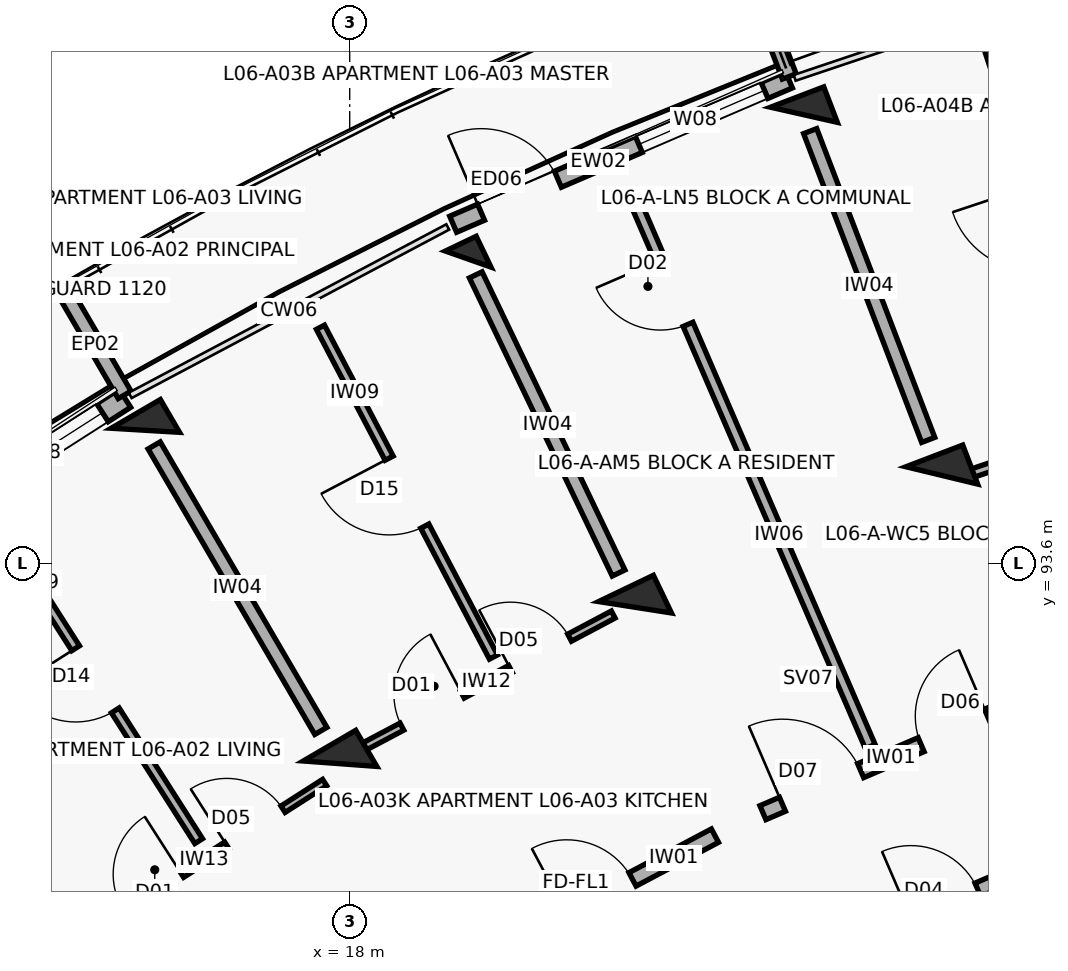
"""IFC4 building model, lengths in metres.
Left out: names, types, materials, properties, quantities, classifications, styles, units other than length and angle.
Written with IfcOpenShell. Run it as: python <this file> out.ifc"""

import sys

from ifc_helpers import new_model, si_unit, direction, frame, frame_2d, origin, origin_2d, place, context, subcontext, project, spatial, rectangle, extrude, element, fill, save


model = new_model("IFC4")
c1 = context("Model", 3, precision=1e-05, world=origin(), true_north=direction((0.0, 1.0)))
c2 = subcontext(c1, "Body", "Model", "MODEL_VIEW")
j1 = project(units=[si_unit("LENGTHUNIT", "METRE"), si_unit("PLANEANGLEUNIT", "RADIAN")], contexts=[c1])
p1 = place(None, origin())
s1 = spatial("IfcSite", under=j1, at=p1, CompositionType="ELEMENT")
p2 = place(p1, origin())
s2 = spatial("IfcBuilding", under=s1, at=p2, CompositionType="ELEMENT")
p3 = place(p2, frame((0.0, 0.0, 20.5)))
s3 = spatial("IfcBuildingStorey", under=s2, at=p3, CompositionType="ELEMENT", Elevation=20.5)
p4 = place(p3, frame((17.873, 90.96, 0.0), z_axis=(0.0, 0.0, 1.0), x_axis=(-0.504226211181, 0.863571611366, 0.0)))
e1 = element("IfcColumn", 1, at=p4, inside=s3, PredefinedType="COLUMN", context=c2, shape_type="SweptSolid", body=[
    extrude(rectangle(XDim=0.55, YDim=0.8, at=origin_2d()), origin(), (0.0, 0.0, 1.0), 3.1),
])
p5 = place(p3, frame((15.311, 95.347, 0.0), z_axis=(0.0, 0.0, 1.0), x_axis=(-0.504226211181, 0.863571611366, 0.0)))
e2 = element("IfcColumn", 2, at=p5, inside=s3, PredefinedType="COLUMN", context=c2, shape_type="SweptSolid", body=[
    extrude(rectangle(XDim=0.5, YDim=0.75, at=origin_2d()), origin(), (0.0, 0.0, 1.0), 3.1),
])
p6 = place(p3, frame((21.754, 93.019, 0.0), z_axis=(0.0, 0.0, 1.0), x_axis=(-0.432085748802, 0.901832526405, 0.0)))
e3 = element("IfcColumn", 3, at=p6, inside=s3, PredefinedType="COLUMN", context=c2, shape_type="SweptSolid", body=[
    extrude(rectangle(XDim=0.55, YDim=0.8, at=origin_2d()), origin(), (0.0, 0.0, 1.0), 3.1),
])
p7 = place(p3, frame((19.559, 97.6, 0.0), z_axis=(0.0, 0.0, 1.0), x_axis=(-0.432085748802, 0.901832526405, 0.0)))
e4 = element("IfcColumn", 4, at=p7, inside=s3, PredefinedType="COLUMN", context=c2, shape_type="SweptSolid", body=[
    extrude(rectangle(XDim=0.45, YDim=0.45, at=origin_2d()), origin(), (0.0, 0.0, 1.0), 3.1),
])
p8 = place(p3, frame((25.79, 94.753, 0.0), z_axis=(0.0, 0.0, 1.0), x_axis=(-0.357064076459, 0.934079892355, 0.0)))
e5 = element("IfcColumn", 5, at=p8, inside=s3, PredefinedType="COLUMN", context=c2, shape_type="SweptSolid", body=[
    extrude(rectangle(XDim=0.55, YDim=0.8, at=origin_2d()), origin(), (0.0, 0.0, 1.0), 3.1),
])
p9 = place(p3, frame((23.976, 99.499, 0.0), z_axis=(0.0, 0.0, 1.0), x_axis=(-0.357064076459, 0.934079892355, 0.0)))
e6 = element("IfcColumn", 6, at=p9, inside=s3, PredefinedType="COLUMN", context=c2, shape_type="SweptSolid", body=[
    extrude(rectangle(XDim=0.5, YDim=0.75, at=origin_2d()), origin(), (0.0, 0.0, 1.0), 3.1),
])
p10 = place(p3, frame((10.992, 93.176, 0.0), z_axis=(0.0, 0.0, 1.0), x_axis=(0.84226218024, 0.539068103061, 0.0)))
e7 = element("IfcWall", 7, at=p10, inside=s3, PredefinedType="SOLIDWALL", context=c2, shape_type="SweptSolid", body=[
    extrude(rectangle(XDim=4.809, YDim=0.282, at=frame_2d((2.404, 0.0))), origin(), (0.0, 0.0, 1.0), 2.25),
])
p11 = place(p10, frame((0.4, 0.0, 0.0)))
e8 = element("IfcOpeningElement", 8, at=p11, cuts=e7, PredefinedType="OPENING", context=c2, shape_type="SweptSolid", body=[
    extrude(rectangle(XDim=1.1, YDim=2.15, at=frame_2d((0.55, 1.075))), frame((0.0, 0.151, 0.0), z_axis=(0.0, -1.0, 0.0), x_axis=(1.0, 0.0, 0.0)), (0.0, 0.0, 1.0), 0.302),
])
p12 = place(p10, frame((2.659, 0.0, 0.35)))
e9 = element("IfcOpeningElement", 9, at=p12, cuts=e7, PredefinedType="OPENING", context=c2, shape_type="SweptSolid", body=[
    extrude(rectangle(XDim=1.8, YDim=1.65, at=frame_2d((0.9, 0.825))), frame((0.0, 0.151, 0.0), z_axis=(0.0, -1.0, 0.0), x_axis=(1.0, 0.0, 0.0)), (0.0, 0.0, 1.0), 0.302),
])
p13 = place(p3, frame((15.039, 95.813, 0.0), z_axis=(0.0, 0.0, 1.0), x_axis=(-0.504228145431, 0.863570481985, 0.0)))
e10 = element("IfcWall", 10, at=p13, inside=s3, PredefinedType="PARAPET", context=c2, shape_type="SweptSolid", body=[
    extrude(rectangle(XDim=1.53, YDim=0.195, at=frame_2d((0.765, 0.0))), origin(), (0.0, 0.0, 1.0), 2.25),
])
p14 = place(p3, frame((19.361, 98.059, 0.0), z_axis=(0.0, 0.0, 1.0), x_axis=(0.918711189033, 0.394930058548, 0.0)))
e11 = element("IfcWall", 11, at=p14, inside=s3, PredefinedType="SOLIDWALL", context=c2, shape_type="SweptSolid", body=[
    extrude(rectangle(XDim=4.809, YDim=0.23, at=frame_2d((2.404, 0.0))), origin(), (0.0, 0.0, 1.0), 2.25),
])
p15 = place(p14, frame((0.4, 0.0, 0.0)))
e12 = element("IfcOpeningElement", 12, at=p15, cuts=e11, PredefinedType="OPENING", context=c2, shape_type="SweptSolid", body=[
    extrude(rectangle(XDim=1.1, YDim=2.15, at=frame_2d((0.55, 1.075))), frame((0.0, 0.125, 0.0), z_axis=(0.0, -1.0, 0.0), x_axis=(1.0, 0.0, 0.0)), (0.0, 0.0, 1.0), 0.25),
])
p16 = place(p14, frame((2.659, 0.0, 0.35)))
e13 = element("IfcOpeningElement", 13, at=p16, cuts=e11, PredefinedType="OPENING", context=c2, shape_type="SweptSolid", body=[
    extrude(rectangle(XDim=1.8, YDim=1.65, at=frame_2d((0.9, 0.825))), frame((0.0, 0.125, 0.0), z_axis=(0.0, -1.0, 0.0), x_axis=(1.0, 0.0, 0.0)), (0.0, 0.0, 1.0), 0.25),
])
p17 = place(p3, frame((23.783, 100.003, 0.0), z_axis=(0.0, 0.0, 1.0), x_axis=(-0.356957296461, 0.934120703391, 0.0)))
e14 = element("IfcWall", 14, at=p17, inside=s3, PredefinedType="PARAPET", context=c2, shape_type="SweptSolid", body=[
    extrude(rectangle(XDim=1.53, YDim=0.195, at=frame_2d((0.765, 0.0))), origin(), (0.0, 0.0, 1.0), 2.25),
])
p18 = place(p3, frame((14.482, 88.672, 0.0), z_axis=(0.0, 0.0, 1.0), x_axis=(0.842245628842, 0.539093962771, 0.0)))
e15 = element("IfcWall", 15, at=p18, inside=s3, PredefinedType="PARTITIONING", context=c2, shape_type="SweptSolid", body=[
    extrude(rectangle(XDim=3.785, YDim=0.1, at=frame_2d((1.893, 0.0))), origin(), (0.0, 0.0, 1.0), 2.08),
])
p19 = place(p18, frame((0.65, 0.0, 0.0)))
e16 = element("IfcOpeningElement", 16, at=p19, cuts=e15, PredefinedType="OPENING", context=c2, shape_type="SweptSolid", body=[
    extrude(rectangle(XDim=0.9, YDim=2.1, at=frame_2d((0.45, 1.05))), frame((0.0, 0.06, 0.0), z_axis=(0.0, -1.0, 0.0), x_axis=(1.0, 0.0, 0.0)), (0.0, 0.0, 1.0), 0.12),
])
p20 = place(p18, frame((2.255, 0.0, 0.0)))
e17 = element("IfcOpeningElement", 17, at=p20, cuts=e15, PredefinedType="OPENING", context=c2, shape_type="SweptSolid", body=[
    extrude(rectangle(XDim=0.88, YDim=2.1, at=frame_2d((0.44, 1.05))), frame((0.0, 0.06, 0.0), z_axis=(0.0, -1.0, 0.0), x_axis=(1.0, 0.0, 0.0)), (0.0, 0.0, 1.0), 0.12),
])
p21 = place(p3, frame((16.013, 89.942, 0.0), z_axis=(0.0, 0.0, 1.0), x_axis=(-0.537785480308, 0.843081714409, 0.0)))
e18 = element("IfcWall", 18, at=p21, inside=s3, PredefinedType="PARTITIONING", context=c2, shape_type="SweptSolid", body=[
    extrude(rectangle(XDim=5.05, YDim=0.12, at=frame_2d((2.525, 0.0))), origin(), (0.0, 0.0, 1.0), 2.08),
])
p22 = place(p21, frame((2.04, 0.0, 0.0)))
e19 = element("IfcOpeningElement", 19, at=p22, cuts=e18, PredefinedType="OPENING", context=c2, shape_type="SweptSolid", body=[
    extrude(rectangle(XDim=0.97, YDim=2.1, at=frame_2d((0.485, 1.05))), frame((0.0, 0.07, 0.0), z_axis=(0.0, -1.0, 0.0), x_axis=(1.0, 0.0, 0.0)), (0.0, 0.0, 1.0), 0.14),
])
p23 = place(p3, frame((19.77, 88.404, 0.0), z_axis=(0.0, 0.0, 1.0), x_axis=(0.883410853063, 0.468599258099, 0.0)))
e20 = element("IfcWall", 20, at=p23, inside=s3, PredefinedType="SOLIDWALL", context=c2, shape_type="SweptSolid", body=[
    extrude(rectangle(XDim=3.436, YDim=0.2, at=frame_2d((1.718, 0.0))), origin(), (0.0, 0.0, 1.0), 2.08),
])
p24 = place(p23, frame((1.228, 0.0, 0.0)))
e21 = element("IfcOpeningElement", 21, at=p24, cuts=e20, PredefinedType="OPENING", context=c2, shape_type="SweptSolid", body=[
    extrude(rectangle(XDim=0.98, YDim=2.15, at=frame_2d((0.49, 1.075))), frame((0.0, 0.11, 0.0), z_axis=(0.0, -1.0, 0.0), x_axis=(1.0, 0.0, 0.0)), (0.0, 0.0, 1.0), 0.22),
])
p25 = place(p3, frame((18.113, 91.144, 0.0), z_axis=(0.0, 0.0, 1.0), x_axis=(0.88341855112, 0.46858474531, 0.0)))
e22 = element("IfcWall", 22, at=p25, inside=s3, PredefinedType="PARTITIONING", context=c2, shape_type="SweptSolid", body=[
    extrude(rectangle(XDim=3.797, YDim=0.105, at=frame_2d((1.898, 0.0))), origin(), (0.0, 0.0, 1.0), 2.08),
])
p26 = place(p25, frame((0.65, 0.0, 0.0)))
e23 = element("IfcOpeningElement", 23, at=p26, cuts=e22, PredefinedType="OPENING", context=c2, shape_type="SweptSolid", body=[
    extrude(rectangle(XDim=0.9, YDim=2.1, at=frame_2d((0.45, 1.05))), frame((0.0, 0.062, 0.0), z_axis=(0.0, -1.0, 0.0), x_axis=(1.0, 0.0, 0.0)), (0.0, 0.0, 1.0), 0.125),
])
p27 = place(p25, frame((2.267, 0.0, 0.0)))
e24 = element("IfcOpeningElement", 24, at=p27, cuts=e22, PredefinedType="OPENING", context=c2, shape_type="SweptSolid", body=[
    extrude(rectangle(XDim=0.88, YDim=2.1, at=frame_2d((0.44, 1.05))), frame((0.0, 0.062, 0.0), z_axis=(0.0, -1.0, 0.0), x_axis=(1.0, 0.0, 0.0)), (0.0, 0.0, 1.0), 0.125),
])
p28 = place(p3, frame((19.891, 92.364, 0.0), z_axis=(0.0, 0.0, 1.0), x_axis=(-0.464567298878, 0.885537816704, 0.0)))
e25 = element("IfcWall", 25, at=p28, inside=s3, PredefinedType="PARTITIONING", context=c2, shape_type="SweptSolid", body=[
    extrude(rectangle(XDim=4.9, YDim=0.12, at=frame_2d((2.45, 0.0))), origin(), (0.0, 0.0, 1.0), 2.08),
])
p29 = place(p28, frame((1.945, 0.0, 0.0)))
e26 = element("IfcOpeningElement", 26, at=p29, cuts=e25, PredefinedType="OPENING", context=c2, shape_type="SweptSolid", body=[
    extrude(rectangle(XDim=1.01, YDim=2.1, at=frame_2d((0.505, 1.05))), frame((0.0, 0.07, 0.0), z_axis=(0.0, -1.0, 0.0), x_axis=(1.0, 0.0, 0.0)), (0.0, 0.0, 1.0), 0.14),
])
p30 = place(p3, frame((17.621, 91.392, 0.0), z_axis=(0.0, 0.0, 1.0), x_axis=(-0.504216452091, 0.863577309475, 0.0)))
e27 = element("IfcWall", 27, at=p30, inside=s3, PredefinedType="SOLIDWALL", context=c2, shape_type="SweptSolid", body=[
    extrude(rectangle(XDim=4.35, YDim=0.185, at=frame_2d((2.175, 0.0))), origin(), (0.0, 0.0, 1.0), 2.08),
])
p31 = place(p3, frame((23.437, 90.316, 0.0), z_axis=(0.0, 0.0, 1.0), x_axis=(0.918718172399, 0.394913813008, 0.0)))
e28 = element("IfcWall", 28, at=p31, inside=s3, PredefinedType="SOLIDWALL", context=c2, shape_type="SweptSolid", body=[
    extrude(rectangle(XDim=3.436, YDim=0.2, at=frame_2d((1.718, 0.0))), origin(), (0.0, 0.0, 1.0), 2.08),
])
p32 = place(p31, frame((0.28, 0.0, 0.0)))
e29 = element("IfcOpeningElement", 29, at=p32, cuts=e28, PredefinedType="OPENING", context=c2, shape_type="SweptSolid", body=[
    extrude(rectangle(XDim=1.12, YDim=2.15, at=frame_2d((0.56, 1.075))), frame((0.0, 0.11, 0.0), z_axis=(0.0, -1.0, 0.0), x_axis=(1.0, 0.0, 0.0)), (0.0, 0.0, 1.0), 0.22),
])
p33 = place(p31, frame((2.266, 0.0, 0.0)))
e30 = element("IfcOpeningElement", 30, at=p33, cuts=e28, PredefinedType="OPENING", context=c2, shape_type="SweptSolid", body=[
    extrude(rectangle(XDim=0.95, YDim=2.1, at=frame_2d((0.475, 1.05))), frame((0.0, 0.11, 0.0), z_axis=(0.0, -1.0, 0.0), x_axis=(1.0, 0.0, 0.0)), (0.0, 0.0, 1.0), 0.22),
])
p34 = place(p3, frame((24.322, 88.467, 0.0), z_axis=(0.0, 0.0, 1.0), x_axis=(0.918723391052, 0.394901672235, 0.0)))
e31 = element("IfcWall", 31, at=p34, inside=s3, PredefinedType="SOLIDWALL", context=c2, shape_type="SweptSolid", body=[
    extrude(rectangle(XDim=3.269, YDim=0.19, at=frame_2d((1.634, 0.0))), origin(), (0.0, 0.0, 1.0), 2.08),
])
p35 = place(p34, frame((1.154, 0.0, 0.0)))
e32 = element("IfcOpeningElement", 32, at=p35, cuts=e31, PredefinedType="OPENING", context=c2, shape_type="SweptSolid", body=[
    extrude(rectangle(XDim=0.96, YDim=2.1, at=frame_2d((0.48, 1.05))), frame((0.0, 0.105, 0.0), z_axis=(0.0, -1.0, 0.0), x_axis=(1.0, 0.0, 0.0)), (0.0, 0.0, 1.0), 0.21),
])
p36 = place(p3, frame((24.849, 91.187, 0.0), z_axis=(0.0, 0.0, 1.0), x_axis=(-0.396278945437, 0.91813016365, 0.0)))
e33 = element("IfcWall", 33, at=p36, inside=s3, PredefinedType="PARTITIONING", context=c2, shape_type="SweptSolid", body=[
    extrude(rectangle(XDim=7.95, YDim=0.14, at=frame_2d((3.975, 0.0))), origin(), (0.0, 0.0, 1.0), 2.08),
])
p37 = place(p36, frame((6.05, 0.0, 0.0)))
e34 = element("IfcOpeningElement", 34, at=p37, cuts=e33, PredefinedType="OPENING", context=c2, shape_type="SweptSolid", body=[
    extrude(rectangle(XDim=0.92, YDim=2.1, at=frame_2d((0.46, 1.05))), frame((0.0, 0.08, 0.0), z_axis=(0.0, -1.0, 0.0), x_axis=(1.0, 0.0, 0.0)), (0.0, 0.0, 1.0), 0.16),
])
p38 = place(p3, frame((21.538, 93.469, 0.0), z_axis=(0.0, 0.0, 1.0), x_axis=(-0.432086898897, 0.901831975371, 0.0)))
e35 = element("IfcWall", 35, at=p38, inside=s3, PredefinedType="SOLIDWALL", context=c2, shape_type="SweptSolid", body=[
    extrude(rectangle(XDim=4.35, YDim=0.185, at=frame_2d((2.175, 0.0))), origin(), (0.0, 0.0, 1.0), 2.08),
])
p39 = place(p3, frame((26.11, 94.756, 0.0), z_axis=(0.0, 0.0, 1.0), x_axis=(0.947873924847, 0.318645606584, 0.0)))
e36 = element("IfcWall", 36, at=p39, inside=s3, PredefinedType="PARTITIONING", context=c2, shape_type="SweptSolid", body=[
    extrude(rectangle(XDim=3.785, YDim=0.115, at=frame_2d((1.893, 0.0))), origin(), (0.0, 0.0, 1.0), 2.08),
])
p40 = place(p39, frame((0.65, 0.0, 0.0)))
e37 = element("IfcOpeningElement", 37, at=p40, cuts=e36, PredefinedType="OPENING", context=c2, shape_type="SweptSolid", body=[
    extrude(rectangle(XDim=0.9, YDim=2.1, at=frame_2d((0.45, 1.05))), frame((0.0, 0.067, 0.0), z_axis=(0.0, -1.0, 0.0), x_axis=(1.0, 0.0, 0.0)), (0.0, 0.0, 1.0), 0.135),
])
p41 = place(p39, frame((2.255, 0.0, 0.0)))
e38 = element("IfcOpeningElement", 38, at=p41, cuts=e36, PredefinedType="OPENING", context=c2, shape_type="SweptSolid", body=[
    extrude(rectangle(XDim=0.88, YDim=2.1, at=frame_2d((0.44, 1.05))), frame((0.0, 0.067, 0.0), z_axis=(0.0, -1.0, 0.0), x_axis=(1.0, 0.0, 0.0)), (0.0, 0.0, 1.0), 0.135),
])
p42 = place(p3, frame((27.98, 95.642, 0.0), z_axis=(0.0, 0.0, 1.0), x_axis=(-0.315749098291, 0.948842719806, 0.0)))
e39 = element("IfcWall", 39, at=p42, inside=s3, PredefinedType="PARTITIONING", context=c2, shape_type="SweptSolid", body=[
    extrude(rectangle(XDim=5.05, YDim=0.12, at=frame_2d((2.525, 0.0))), origin(), (0.0, 0.0, 1.0), 2.08),
])
p43 = place(p42, frame((1.96, 0.0, 0.0)))
e40 = element("IfcOpeningElement", 40, at=p43, cuts=e39, PredefinedType="OPENING", context=c2, shape_type="SweptSolid", body=[
    extrude(rectangle(XDim=1.13, YDim=2.1, at=frame_2d((0.565, 1.05))), frame((0.0, 0.07, 0.0), z_axis=(0.0, -1.0, 0.0), x_axis=(1.0, 0.0, 0.0)), (0.0, 0.0, 1.0), 0.14),
])
p44 = place(p3, frame((25.611, 95.22, 0.0), z_axis=(0.0, 0.0, 1.0), x_axis=(-0.357064016205, 0.934079915388, 0.0)))
e41 = element("IfcWall", 41, at=p44, inside=s3, PredefinedType="SOLIDWALL", context=c2, shape_type="SweptSolid", body=[
    extrude(rectangle(XDim=4.35, YDim=0.185, at=frame_2d((2.175, 0.0))), origin(), (0.0, 0.0, 1.0), 2.08),
])
p45 = place(p12, origin())
e42 = element("IfcWindow", 42, at=p45, inside=s3, PartitioningType="TRIPLE_PANEL_VERTICAL", PredefinedType="WINDOW", context=c2, shape_type="SweptSolid", body=[
    extrude(rectangle(XDim=1.8, YDim=1.65, at=frame_2d((0.9, 0.825))), frame((0.0, 0.03, 0.0), z_axis=(0.0, -1.0, 0.0), x_axis=(1.0, 0.0, 0.0)), (0.0, 0.0, 1.0), 0.06),
])
fill(e9, e42)
p46 = place(p15, origin())
e43 = element("IfcDoor", 43, at=p46, inside=s3, OperationType="SINGLE_SWING_LEFT", PredefinedType="DOOR", context=c2, shape_type="SweptSolid", body=[
    extrude(rectangle(XDim=1.1, YDim=2.15, at=frame_2d((0.55, 1.075))), frame((0.0, 0.025, 0.0), z_axis=(0.0, -1.0, 0.0), x_axis=(1.0, 0.0, 0.0)), (0.0, 0.0, 1.0), 0.05),
])
fill(e12, e43)
p47 = place(p16, origin())
e44 = element("IfcWindow", 44, at=p47, inside=s3, PartitioningType="TRIPLE_PANEL_VERTICAL", PredefinedType="WINDOW", context=c2, shape_type="SweptSolid", body=[
    extrude(rectangle(XDim=1.8, YDim=1.65, at=frame_2d((0.9, 0.825))), frame((0.0, 0.03, 0.0), z_axis=(0.0, -1.0, 0.0), x_axis=(1.0, 0.0, 0.0)), (0.0, 0.0, 1.0), 0.06),
])
fill(e13, e44)
p48 = place(p19, origin())
e45 = element("IfcDoor", 45, at=p48, inside=s3, OperationType="SINGLE_SWING_RIGHT", PredefinedType="DOOR", context=c2, shape_type="SweptSolid", body=[
    extrude(rectangle(XDim=0.9, YDim=2.1, at=frame_2d((0.45, 1.05))), frame((0.0, 0.025, 0.0), z_axis=(0.0, -1.0, 0.0), x_axis=(1.0, 0.0, 0.0)), (0.0, 0.0, 1.0), 0.05),
])
fill(e16, e45)
p49 = place(p20, origin())
e46 = element("IfcDoor", 46, at=p49, inside=s3, OperationType="SINGLE_SWING_LEFT", PredefinedType="DOOR", context=c2, shape_type="SweptSolid", body=[
    extrude(rectangle(XDim=0.88, YDim=2.1, at=frame_2d((0.44, 1.05))), frame((0.0, 0.025, 0.0), z_axis=(0.0, -1.0, 0.0), x_axis=(1.0, 0.0, 0.0)), (0.0, 0.0, 1.0), 0.05),
])
fill(e17, e46)
p50 = place(p22, origin())
e47 = element("IfcDoor", 47, at=p50, inside=s3, OperationType="SINGLE_SWING_RIGHT", PredefinedType="DOOR", context=c2, shape_type="SweptSolid", body=[
    extrude(rectangle(XDim=0.97, YDim=2.1, at=frame_2d((0.485, 1.05))), frame((0.0, 0.025, 0.0), z_axis=(0.0, -1.0, 0.0), x_axis=(1.0, 0.0, 0.0)), (0.0, 0.0, 1.0), 0.05),
])
fill(e19, e47)
p51 = place(p24, origin())
e48 = element("IfcDoor", 48, at=p51, inside=s3, OperationType="SINGLE_SWING_LEFT", PredefinedType="DOOR", context=c2, shape_type="SweptSolid", body=[
    extrude(rectangle(XDim=0.98, YDim=2.15, at=frame_2d((0.49, 1.075))), frame((0.0, 0.025, 0.0), z_axis=(0.0, -1.0, 0.0), x_axis=(1.0, 0.0, 0.0)), (0.0, 0.0, 1.0), 0.05),
])
fill(e21, e48)
p52 = place(p26, origin())
e49 = element("IfcDoor", 49, at=p52, inside=s3, OperationType="SINGLE_SWING_RIGHT", PredefinedType="DOOR", context=c2, shape_type="SweptSolid", body=[
    extrude(rectangle(XDim=0.9, YDim=2.1, at=frame_2d((0.45, 1.05))), frame((0.0, 0.025, 0.0), z_axis=(0.0, -1.0, 0.0), x_axis=(1.0, 0.0, 0.0)), (0.0, 0.0, 1.0), 0.05),
])
fill(e23, e49)
p53 = place(p27, origin())
e50 = element("IfcDoor", 50, at=p53, inside=s3, OperationType="SINGLE_SWING_LEFT", PredefinedType="DOOR", context=c2, shape_type="SweptSolid", body=[
    extrude(rectangle(XDim=0.88, YDim=2.1, at=frame_2d((0.44, 1.05))), frame((0.0, 0.025, 0.0), z_axis=(0.0, -1.0, 0.0), x_axis=(1.0, 0.0, 0.0)), (0.0, 0.0, 1.0), 0.05),
])
fill(e24, e50)
p54 = place(p29, origin())
e51 = element("IfcDoor", 51, at=p54, inside=s3, OperationType="SINGLE_SWING_RIGHT", PredefinedType="DOOR", context=c2, shape_type="SweptSolid", body=[
    extrude(rectangle(XDim=1.01, YDim=2.1, at=frame_2d((0.505, 1.05))), frame((0.0, 0.025, 0.0), z_axis=(0.0, -1.0, 0.0), x_axis=(1.0, 0.0, 0.0)), (0.0, 0.0, 1.0), 0.05),
])
fill(e26, e51)
p55 = place(p32, origin())
e52 = element("IfcDoor", 52, at=p55, inside=s3, OperationType="SINGLE_SWING_LEFT", PredefinedType="DOOR", context=c2, shape_type="SweptSolid", body=[
    extrude(rectangle(XDim=1.12, YDim=2.15, at=frame_2d((0.56, 1.075))), frame((0.0, 0.025, 0.0), z_axis=(0.0, -1.0, 0.0), x_axis=(1.0, 0.0, 0.0)), (0.0, 0.0, 1.0), 0.05),
])
fill(e29, e52)
p56 = place(p33, origin())
e53 = element("IfcDoor", 53, at=p56, inside=s3, OperationType="SINGLE_SWING_RIGHT", PredefinedType="DOOR", context=c2, shape_type="SweptSolid", body=[
    extrude(rectangle(XDim=0.95, YDim=2.1, at=frame_2d((0.475, 1.05))), frame((0.0, 0.025, 0.0), z_axis=(0.0, -1.0, 0.0), x_axis=(1.0, 0.0, 0.0)), (0.0, 0.0, 1.0), 0.05),
])
fill(e30, e53)
p57 = place(p35, origin())
e54 = element("IfcDoor", 54, at=p57, inside=s3, OperationType="SINGLE_SWING_LEFT", PredefinedType="DOOR", context=c2, shape_type="SweptSolid", body=[
    extrude(rectangle(XDim=0.96, YDim=2.1, at=frame_2d((0.48, 1.05))), frame((0.0, 0.025, 0.0), z_axis=(0.0, -1.0, 0.0), x_axis=(1.0, 0.0, 0.0)), (0.0, 0.0, 1.0), 0.05),
])
fill(e32, e54)
p58 = place(p37, origin())
e55 = element("IfcDoor", 55, at=p58, inside=s3, OperationType="SINGLE_SWING_RIGHT", PredefinedType="DOOR", context=c2, shape_type="SweptSolid", body=[
    extrude(rectangle(XDim=0.92, YDim=2.1, at=frame_2d((0.46, 1.05))), frame((0.0, 0.025, 0.0), z_axis=(0.0, -1.0, 0.0), x_axis=(1.0, 0.0, 0.0)), (0.0, 0.0, 1.0), 0.05),
])
fill(e34, e55)
save(model, sys.argv[1])
